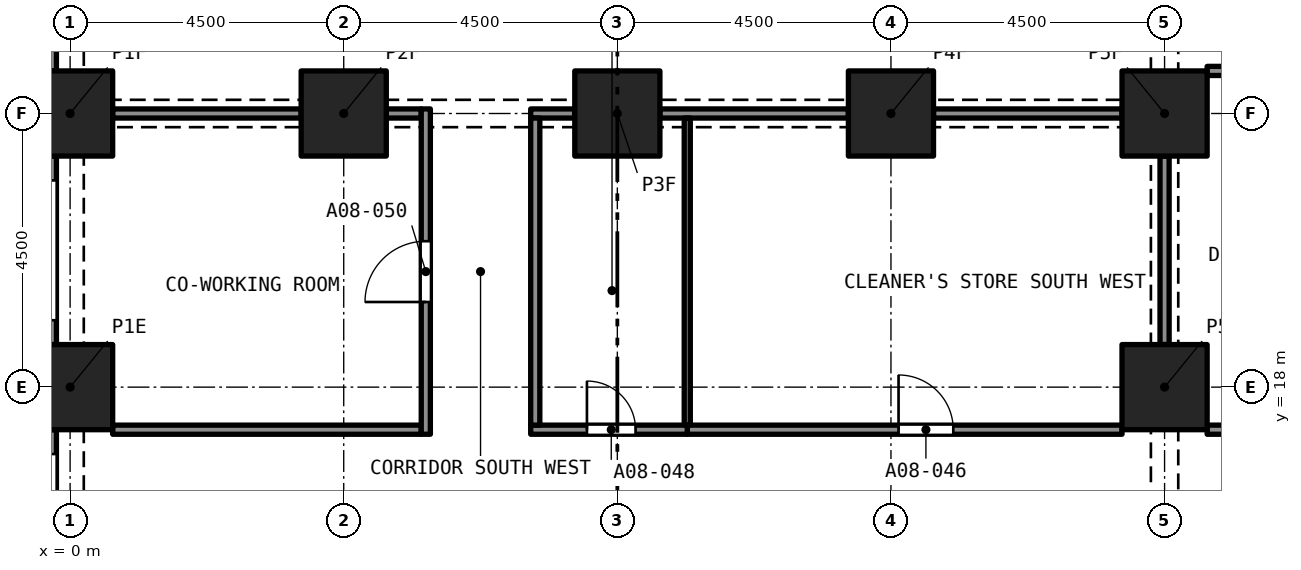
"""IFC4 building model, lengths in metres.
Left out: names, types, materials, properties, quantities, classifications, styles, units other than length and angle.
Written with IfcOpenShell. Run it as: python <this file> out.ifc"""

import sys

from ifc_helpers import new_model, si_unit, direction, frame, frame_2d, origin, origin_2d, place, context, subcontext, project, spatial, rectangle, extrude, element, fill, save


model = new_model("IFC4")
c1 = context("Model", 3, precision=1e-05, world=origin(), true_north=direction((0.0, 1.0)))
c2 = subcontext(c1, "Body", "Model", "MODEL_VIEW")
j1 = project(units=[si_unit("LENGTHUNIT", "METRE"), si_unit("PLANEANGLEUNIT", "RADIAN")], contexts=[c1])
p1 = place(None, origin())
s1 = spatial("IfcSite", under=j1, at=p1, CompositionType="ELEMENT")
p2 = place(p1, origin())
s2 = spatial("IfcBuilding", under=s1, at=p2, CompositionType="ELEMENT")
p3 = place(p2, frame((0.0, 0.0, 36.8)))
s3 = spatial("IfcBuildingStorey", under=s2, at=p3, CompositionType="ELEMENT", Elevation=36.8)
for number, where, z_axis, x_axis in (
    (1, (0.0, 18.0, 0.0), (0.0, 0.0, 1.0), (1.0, 0.0, 0.0)),
    (2, (18.0, 18.0, 0.0), (0.0, 0.0, 1.0), (1.0, 0.0, 0.0)),
    (3, (0.0, 22.5, 0.0), (0.0, 0.0, 1.0), (1.0, 0.0, 0.0)),
    (4, (4.5, 22.5, 0.0), (0.0, 0.0, 1.0), (1.0, 0.0, 0.0)),
    (5, (9.0, 22.5, 0.0), (0.0, 0.0, 1.0), (1.0, 0.0, 0.0)),
    (6, (13.5, 22.5, 0.0), (0.0, 0.0, 1.0), (1.0, 0.0, 0.0)),
    (7, (18.0, 22.5, 0.0), (0.0, 0.0, 1.0), (1.0, 0.0, 0.0)),
):
    element("IfcColumn", number, at=place(p3, frame(where, z_axis=z_axis, x_axis=x_axis)), inside=s3, PredefinedType="COLUMN", context=c2, shape_type="SweptSolid", body=[
        extrude(rectangle(XDim=1.4, YDim=1.4, at=origin_2d()), origin(), (0.0, 0.0, 1.0), 3.2),
    ])
p4 = place(p3, frame((-0.375, 23.2, 0.0), z_axis=(0.0, 0.0, 1.0), x_axis=(0.0, 1.0, 0.0)))
e8 = element("IfcWall", 8, at=p4, inside=s3, PredefinedType="SOLIDWALL", context=c2, shape_type="SweptSolid", body=[
    extrude(rectangle(XDim=3.1, YDim=0.3, at=frame_2d((1.55, 0.0))), origin(), (0.0, 0.0, 1.0), 3.2),
])
p5 = place(p4, frame((0.4, 0.0, 0.45)))
e9 = element("IfcOpeningElement", 9, at=p5, cuts=e8, PredefinedType="OPENING", context=c2, shape_type="SweptSolid", body=[
    extrude(rectangle(XDim=2.3, YDim=1.95, at=frame_2d((1.15, 0.975))), frame((0.0, 0.16, 0.0), z_axis=(0.0, -1.0, 0.0), x_axis=(1.0, 0.0, 0.0)), (0.0, 0.0, 1.0), 0.32),
])
p6 = place(p3, frame((-0.375, 18.7, 0.0), z_axis=(0.0, 0.0, 1.0), x_axis=(0.0, 1.0, 0.0)))
e10 = element("IfcWall", 10, at=p6, inside=s3, PredefinedType="SOLIDWALL", context=c2, shape_type="SweptSolid", body=[
    extrude(rectangle(XDim=3.1, YDim=0.3, at=frame_2d((1.55, 0.0))), origin(), (0.0, 0.0, 1.0), 3.2),
])
p7 = place(p6, frame((0.4, 0.0, 0.45)))
e11 = element("IfcOpeningElement", 11, at=p7, cuts=e10, PredefinedType="OPENING", context=c2, shape_type="SweptSolid", body=[
    extrude(rectangle(XDim=2.3, YDim=1.95, at=frame_2d((1.15, 0.975))), frame((0.0, 0.16, 0.0), z_axis=(0.0, -1.0, 0.0), x_axis=(1.0, 0.0, 0.0)), (0.0, 0.0, 1.0), 0.32),
])
p8 = place(p3, frame((-0.375, 14.2, 0.0), z_axis=(0.0, 0.0, 1.0), x_axis=(0.0, 1.0, 0.0)))
e12 = element("IfcWall", 12, at=p8, inside=s3, PredefinedType="SOLIDWALL", context=c2, shape_type="SweptSolid", body=[
    extrude(rectangle(XDim=3.1, YDim=0.3, at=frame_2d((1.55, 0.0))), origin(), (0.0, 0.0, 1.0), 3.2),
])
p9 = place(p8, frame((0.4, 0.0, 0.45)))
e13 = element("IfcOpeningElement", 13, at=p9, cuts=e12, PredefinedType="OPENING", context=c2, shape_type="SweptSolid", body=[
    extrude(rectangle(XDim=2.3, YDim=1.95, at=frame_2d((1.15, 0.975))), frame((0.0, 0.16, 0.0), z_axis=(0.0, -1.0, 0.0), x_axis=(1.0, 0.0, 0.0)), (0.0, 0.0, 1.0), 0.32),
])
p10 = place(p3, frame((18.7, 17.3, 0.0), z_axis=(0.0, 0.0, 1.0), x_axis=(1.0, 0.0, 0.0)))
e14 = element("IfcWall", 14, at=p10, inside=s3, PredefinedType="PARTITIONING", context=c2, shape_type="SweptSolid", body=[
    extrude(rectangle(XDim=5.075, YDim=0.15, at=frame_2d((2.538, 0.0))), origin(), (0.0, 0.0, 1.0), 2.75),
])
p11 = place(p3, frame((10.15, 17.3, 0.0), z_axis=(0.0, 0.0, 1.0), x_axis=(1.0, 0.0, 0.0)))
e15 = element("IfcWall", 15, at=p11, inside=s3, PredefinedType="PARTITIONING", context=c2, shape_type="SweptSolid", body=[
    extrude(rectangle(XDim=7.15, YDim=0.15, at=frame_2d((3.575, 0.0))), origin(), (0.0, 0.0, 1.0), 2.9),
])
p12 = place(p11, frame((3.475, 0.0, 0.0)))
e16 = element("IfcOpeningElement", 16, at=p12, cuts=e15, PredefinedType="OPENING", context=c2, shape_type="SweptSolid", body=[
    extrude(rectangle(XDim=0.9, YDim=2.1, at=frame_2d((0.45, 1.05))), frame((0.0, 0.085, 0.0), z_axis=(0.0, -1.0, 0.0), x_axis=(1.0, 0.0, 0.0)), (0.0, 0.0, 1.0), 0.17),
])
p13 = place(p3, frame((7.575, 17.3, 0.0), z_axis=(0.0, 0.0, 1.0), x_axis=(1.0, 0.0, 0.0)))
e17 = element("IfcWall", 17, at=p13, inside=s3, PredefinedType="PARTITIONING", context=c2, shape_type="SweptSolid", body=[
    extrude(rectangle(XDim=2.575, YDim=0.15, at=frame_2d((1.288, 0.0))), origin(), (0.0, 0.0, 1.0), 2.9),
])
p14 = place(p13, frame((0.925, 0.0, 0.0)))
e18 = element("IfcOpeningElement", 18, at=p14, cuts=e17, PredefinedType="OPENING", context=c2, shape_type="SweptSolid", body=[
    extrude(rectangle(XDim=0.8, YDim=2.1, at=frame_2d((0.4, 1.05))), frame((0.0, 0.085, 0.0), z_axis=(0.0, -1.0, 0.0), x_axis=(1.0, 0.0, 0.0)), (0.0, 0.0, 1.0), 0.17),
])
p15 = place(p3, frame((0.7, 17.3, 0.0), z_axis=(0.0, 0.0, 1.0), x_axis=(1.0, 0.0, 0.0)))
e19 = element("IfcWall", 19, at=p15, inside=s3, PredefinedType="PARTITIONING", context=c2, shape_type="SweptSolid", body=[
    extrude(rectangle(XDim=5.075, YDim=0.15, at=frame_2d((2.538, 0.0))), origin(), (0.0, 0.0, 1.0), 2.9),
])
p16 = place(p3, frame((18.7, 23.2, 0.0), z_axis=(0.0, 0.0, 1.0), x_axis=(1.0, 0.0, 0.0)))
e20 = element("IfcWall", 20, at=p16, inside=s3, PredefinedType="PARTITIONING", context=c2, shape_type="SweptSolid", body=[
    extrude(rectangle(XDim=5.075, YDim=0.15, at=frame_2d((2.538, 0.0))), origin(), (0.0, 0.0, 1.0), 2.75),
])
for number, where, z_axis, x_axis in (
    (21, (18.0, 18.7, 0.0), (0.0, 0.0, 1.0), (0.0, 1.0, 0.0)),
    (22, (14.2, 22.5, 0.0), (0.0, 0.0, 1.0), (1.0, 0.0, 0.0)),
    (23, (9.7, 22.5, 0.0), (0.0, 0.0, 1.0), (1.0, 0.0, 0.0)),
):
    element("IfcWall", number, at=place(p3, frame(where, z_axis=z_axis, x_axis=x_axis)), inside=s3, PredefinedType="PARTITIONING", context=c2, shape_type="SweptSolid", body=[
        extrude(rectangle(XDim=3.1, YDim=0.15, at=frame_2d((1.55, 0.0))), origin(), (0.0, 0.0, 1.0), 2.38),
    ])
p17 = place(p3, frame((7.575, 22.5, 0.0), z_axis=(0.0, 0.0, 1.0), x_axis=(1.0, 0.0, 0.0)))
e24 = element("IfcWall", 24, at=p17, inside=s3, PredefinedType="PARTITIONING", context=c2, shape_type="SweptSolid", body=[
    extrude(rectangle(XDim=0.725, YDim=0.15, at=frame_2d((0.363, 0.0))), origin(), (0.0, 0.0, 1.0), 2.38),
])
p18 = place(p3, frame((5.2, 22.5, 0.0), z_axis=(0.0, 0.0, 1.0), x_axis=(1.0, 0.0, 0.0)))
e25 = element("IfcWall", 25, at=p18, inside=s3, PredefinedType="PARTITIONING", context=c2, shape_type="SweptSolid", body=[
    extrude(rectangle(XDim=0.575, YDim=0.15, at=frame_2d((0.288, 0.0))), origin(), (0.0, 0.0, 1.0), 2.38),
])
p19 = place(p3, frame((0.7, 22.5, 0.0), z_axis=(0.0, 0.0, 1.0), x_axis=(1.0, 0.0, 0.0)))
e26 = element("IfcWall", 26, at=p19, inside=s3, PredefinedType="PARTITIONING", context=c2, shape_type="SweptSolid", body=[
    extrude(rectangle(XDim=3.1, YDim=0.15, at=frame_2d((1.55, 0.0))), origin(), (0.0, 0.0, 1.0), 2.38),
])
p20 = place(p3, frame((7.65, 17.375, 0.0), z_axis=(0.0, 0.0, 1.0), x_axis=(0.0, 1.0, 0.0)))
e27 = element("IfcWall", 27, at=p20, inside=s3, PredefinedType="PARTITIONING", context=c2, shape_type="SweptSolid", body=[
    extrude(rectangle(XDim=5.05, YDim=0.15, at=frame_2d((2.525, 0.0))), origin(), (0.0, 0.0, 1.0), 2.9),
])
p21 = place(p3, frame((5.85, 17.225, 0.0), z_axis=(0.0, 0.0, 1.0), x_axis=(0.0, 1.0, 0.0)))
e28 = element("IfcWall", 28, at=p21, inside=s3, PredefinedType="PARTITIONING", context=c2, shape_type="SweptSolid", body=[
    extrude(rectangle(XDim=5.35, YDim=0.15, at=frame_2d((2.675, 0.0))), origin(), (0.0, 0.0, 1.0), 2.9),
])
p22 = place(p21, frame((2.175, 0.0, 0.0)))
e29 = element("IfcOpeningElement", 29, at=p22, cuts=e28, PredefinedType="OPENING", context=c2, shape_type="SweptSolid", body=[
    extrude(rectangle(XDim=1.0, YDim=2.1, at=frame_2d((0.5, 1.05))), frame((0.0, 0.085, 0.0), z_axis=(0.0, -1.0, 0.0), x_axis=(1.0, 0.0, 0.0)), (0.0, 0.0, 1.0), 0.17),
])
p23 = place(p3, frame((10.15, 17.375, 0.0), z_axis=(0.0, 0.0, 1.0), x_axis=(0.0, 1.0, 0.0)))
e30 = element("IfcWall", 30, at=p23, inside=s3, PredefinedType="PARTITIONING", context=c2, shape_type="SweptSolid", body=[
    extrude(rectangle(XDim=5.05, YDim=0.1, at=frame_2d((2.525, 0.0))), origin(), (0.0, 0.0, 1.0), 2.9),
])
p24 = place(p12, origin())
e31 = element("IfcDoor", 31, at=p24, inside=s3, OperationType="SINGLE_SWING_RIGHT", PredefinedType="DOOR", context=c2, shape_type="SweptSolid", body=[
    extrude(rectangle(XDim=0.9, YDim=2.1, at=frame_2d((0.45, 1.05))), frame((0.0, 0.025, 0.0), z_axis=(0.0, -1.0, 0.0), x_axis=(1.0, 0.0, 0.0)), (0.0, 0.0, 1.0), 0.05),
])
fill(e16, e31)
p25 = place(p14, origin())
e32 = element("IfcDoor", 32, at=p25, inside=s3, OperationType="SINGLE_SWING_RIGHT", PredefinedType="DOOR", context=c2, shape_type="SweptSolid", body=[
    extrude(rectangle(XDim=0.8, YDim=2.1, at=frame_2d((0.4, 1.05))), frame((0.0, 0.025, 0.0), z_axis=(0.0, -1.0, 0.0), x_axis=(1.0, 0.0, 0.0)), (0.0, 0.0, 1.0), 0.05),
])
fill(e18, e32)
p26 = place(p22, origin())
e33 = element("IfcDoor", 33, at=p26, inside=s3, OperationType="SINGLE_SWING_LEFT", PredefinedType="DOOR", context=c2, shape_type="SweptSolid", body=[
    extrude(rectangle(XDim=1.0, YDim=2.1, at=frame_2d((0.5, 1.05))), frame((0.0, 0.025, 0.0), z_axis=(0.0, -1.0, 0.0), x_axis=(1.0, 0.0, 0.0)), (0.0, 0.0, 1.0), 0.05),
])
fill(e29, e33)
save(model, sys.argv[1])
